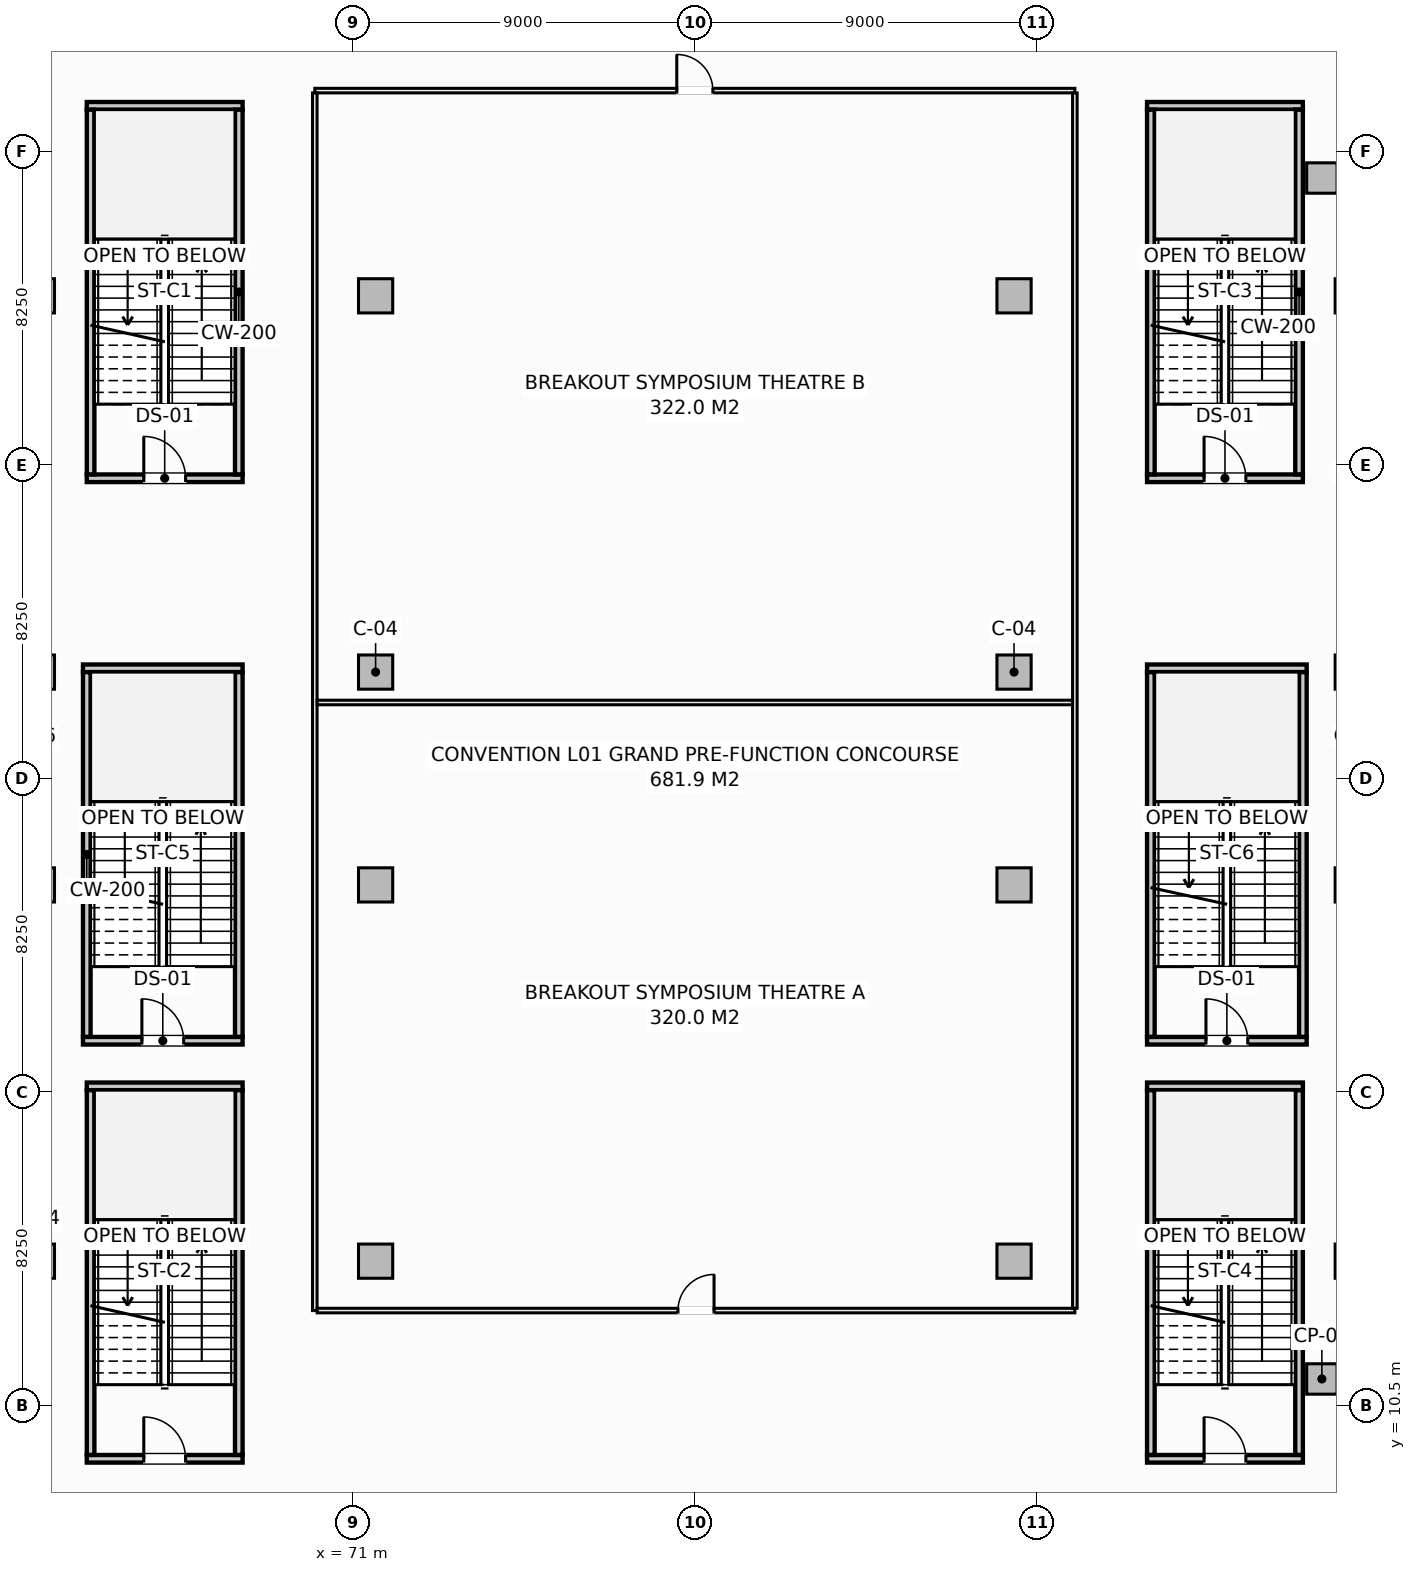
"""IFC4 building model, lengths in metres.
Left out: names, types, materials, properties, quantities, classifications, styles, units other than length and angle.
Written with IfcOpenShell. Run it as: python <this file> out.ifc"""

import sys

from ifc_helpers import new_model, si_unit, direction, frame, frame_2d, origin, origin_2d, place, context, subcontext, project, spatial, rectangle, extrude, element, fill, save


model = new_model("IFC4")
c1 = context("Model", 3, precision=1e-05, world=origin(), true_north=direction((0.0, 1.0)))
c2 = subcontext(c1, "Body", "Model", "MODEL_VIEW")
j1 = project(units=[si_unit("LENGTHUNIT", "METRE"), si_unit("PLANEANGLEUNIT", "RADIAN")], contexts=[c1])
p1 = place(None, origin())
s1 = spatial("IfcSite", under=j1, at=p1, CompositionType="ELEMENT")
p2 = place(p1, origin())
s2 = spatial("IfcBuilding", under=s1, at=p2, CompositionType="ELEMENT")
p3 = place(p2, frame((0.0, 0.0, 5.0)))
s3 = spatial("IfcBuildingStorey", under=s2, at=p3, CompositionType="ELEMENT", Elevation=5.0)
for number, where, z_axis, x_axis in (
    (1, (62.7, 14.3, -0.26), (0.0, 0.0, 1.0), (1.0, 0.0, 0.0)),
    (2, (62.7, 24.2, -0.26), (0.0, 0.0, 1.0), (1.0, 0.0, 0.0)),
    (3, (62.7, 29.8, -0.26), (0.0, 0.0, 1.0), (1.0, 0.0, 0.0)),
    (4, (62.7, 39.7, -0.26), (0.0, 0.0, 1.0), (1.0, 0.0, 0.0)),
    (5, (71.6, 14.3, -0.26), (0.0, 0.0, 1.0), (1.0, 0.0, 0.0)),
    (6, (71.6, 24.2, -0.26), (0.0, 0.0, 1.0), (1.0, 0.0, 0.0)),
    (7, (71.6, 29.8, -0.26), (0.0, 0.0, 1.0), (1.0, 0.0, 0.0)),
    (8, (71.6, 39.7, -0.26), (0.0, 0.0, 1.0), (1.0, 0.0, 0.0)),
    (9, (88.4, 14.3, -0.26), (0.0, 0.0, 1.0), (1.0, 0.0, 0.0)),
    (10, (88.4, 24.2, -0.26), (0.0, 0.0, 1.0), (1.0, 0.0, 0.0)),
    (11, (88.4, 29.8, -0.26), (0.0, 0.0, 1.0), (1.0, 0.0, 0.0)),
    (12, (88.4, 39.7, -0.26), (0.0, 0.0, 1.0), (1.0, 0.0, 0.0)),
    (13, (97.3, 14.3, -0.26), (0.0, 0.0, 1.0), (1.0, 0.0, 0.0)),
    (14, (97.3, 24.2, -0.26), (0.0, 0.0, 1.0), (1.0, 0.0, 0.0)),
    (15, (97.3, 29.8, -0.26), (0.0, 0.0, 1.0), (1.0, 0.0, 0.0)),
    (16, (97.3, 39.7, -0.26), (0.0, 0.0, 1.0), (1.0, 0.0, 0.0)),
):
    element("IfcColumn", number, at=place(p3, frame(where, z_axis=z_axis, x_axis=x_axis)), inside=s3, PredefinedType="COLUMN", context=c2, shape_type="SweptSolid", body=[
        extrude(rectangle(XDim=0.9, YDim=0.9, at=origin_2d()), origin(), (0.0, 0.0, 1.0), 5.0),
    ])
for number, where, z_axis, x_axis in (
    (17, (96.5, 11.2, -0.26), (0.0, 0.0, 1.0), (1.0, 0.0, 0.0)),
    (18, (96.5, 42.8, -0.26), (0.0, 0.0, 1.0), (1.0, 0.0, 0.0)),
):
    element("IfcColumn", number, at=place(p3, frame(where, z_axis=z_axis, x_axis=x_axis)), inside=s3, PredefinedType="PILASTER", context=c2, shape_type="SweptSolid", body=[
        extrude(rectangle(XDim=0.8, YDim=0.8, at=origin_2d()), origin(), (0.0, 0.0, 1.0), 5.0),
    ])
p4 = place(p3, frame((64.0, 34.9, -0.26), z_axis=(0.0, 0.0, 1.0), x_axis=(1.0, 0.0, 0.0)))
e19 = element("IfcWall", 19, at=p4, inside=s3, PredefinedType="SHEAR", context=c2, shape_type="SweptSolid", body=[
    extrude(rectangle(XDim=4.1, YDim=0.2, at=frame_2d((2.05, 0.0))), origin(), (0.0, 0.0, 1.0), 5.0),
])
p5 = place(p4, frame((1.5, 0.0, 0.26)))
e20 = element("IfcOpeningElement", 20, at=p5, cuts=e19, PredefinedType="OPENING", context=c2, shape_type="SweptSolid", body=[
    extrude(rectangle(XDim=1.1, YDim=2.15, at=frame_2d((0.55, 1.075))), frame((0.0, 0.11, 0.0), z_axis=(0.0, -1.0, 0.0), x_axis=(1.0, 0.0, 0.0)), (0.0, 0.0, 1.0), 0.22),
])
p6 = place(p3, frame((64.0, 44.7, -0.26), z_axis=(0.0, 0.0, 1.0), x_axis=(1.0, 0.0, 0.0)))
e21 = element("IfcWall", 21, at=p6, inside=s3, PredefinedType="SHEAR", context=c2, shape_type="SweptSolid", body=[
    extrude(rectangle(XDim=4.1, YDim=0.2, at=frame_2d((2.05, 0.0))), origin(), (0.0, 0.0, 1.0), 5.0),
])
for number, where, z_axis, x_axis in (
    (22, (64.1, 35.002, -0.26), (0.0, 0.0, 1.0), (0.0, 1.0, 0.0)),
    (23, (68.0, 35.002, -0.26), (0.0, 0.0, 1.0), (0.0, 1.0, 0.0)),
):
    element("IfcWall", number, at=place(p3, frame(where, z_axis=z_axis, x_axis=x_axis)), inside=s3, PredefinedType="SHEAR", context=c2, shape_type="SweptSolid", body=[
        extrude(rectangle(XDim=9.596, YDim=0.2, at=frame_2d((4.798, 0.0))), origin(), (0.0, 0.0, 1.0), 5.0),
    ])
p7 = place(p3, frame((64.0, 9.1, -0.26), z_axis=(0.0, 0.0, 1.0), x_axis=(1.0, 0.0, 0.0)))
e24 = element("IfcWall", 24, at=p7, inside=s3, PredefinedType="SHEAR", context=c2, shape_type="SweptSolid", body=[
    extrude(rectangle(XDim=4.1, YDim=0.2, at=frame_2d((2.05, 0.0))), origin(), (0.0, 0.0, 1.0), 5.0),
])
p8 = place(p7, frame((1.5, 0.0, 0.26)))
e25 = element("IfcOpeningElement", 25, at=p8, cuts=e24, PredefinedType="OPENING", context=c2, shape_type="SweptSolid", body=[
    extrude(rectangle(XDim=1.1, YDim=2.15, at=frame_2d((0.55, 1.075))), frame((0.0, 0.11, 0.0), z_axis=(0.0, -1.0, 0.0), x_axis=(1.0, 0.0, 0.0)), (0.0, 0.0, 1.0), 0.22),
])
p9 = place(p3, frame((64.0, 18.9, -0.26), z_axis=(0.0, 0.0, 1.0), x_axis=(1.0, 0.0, 0.0)))
e26 = element("IfcWall", 26, at=p9, inside=s3, PredefinedType="SHEAR", context=c2, shape_type="SweptSolid", body=[
    extrude(rectangle(XDim=4.1, YDim=0.2, at=frame_2d((2.05, 0.0))), origin(), (0.0, 0.0, 1.0), 5.0),
])
for number, where, z_axis, x_axis in (
    (27, (64.1, 9.202, -0.26), (0.0, 0.0, 1.0), (0.0, 1.0, 0.0)),
    (28, (68.0, 9.202, -0.26), (0.0, 0.0, 1.0), (0.0, 1.0, 0.0)),
):
    element("IfcWall", number, at=place(p3, frame(where, z_axis=z_axis, x_axis=x_axis)), inside=s3, PredefinedType="SHEAR", context=c2, shape_type="SweptSolid", body=[
        extrude(rectangle(XDim=9.596, YDim=0.2, at=frame_2d((4.798, 0.0))), origin(), (0.0, 0.0, 1.0), 5.0),
    ])
p10 = place(p3, frame((91.9, 34.9, -0.26), z_axis=(0.0, 0.0, 1.0), x_axis=(1.0, 0.0, 0.0)))
e29 = element("IfcWall", 29, at=p10, inside=s3, PredefinedType="SHEAR", context=c2, shape_type="SweptSolid", body=[
    extrude(rectangle(XDim=4.1, YDim=0.2, at=frame_2d((2.05, 0.0))), origin(), (0.0, 0.0, 1.0), 5.0),
])
p11 = place(p10, frame((1.5, 0.0, 0.26)))
e30 = element("IfcOpeningElement", 30, at=p11, cuts=e29, PredefinedType="OPENING", context=c2, shape_type="SweptSolid", body=[
    extrude(rectangle(XDim=1.1, YDim=2.15, at=frame_2d((0.55, 1.075))), frame((0.0, 0.11, 0.0), z_axis=(0.0, -1.0, 0.0), x_axis=(1.0, 0.0, 0.0)), (0.0, 0.0, 1.0), 0.22),
])
p12 = place(p3, frame((91.9, 44.7, -0.26), z_axis=(0.0, 0.0, 1.0), x_axis=(1.0, 0.0, 0.0)))
e31 = element("IfcWall", 31, at=p12, inside=s3, PredefinedType="SHEAR", context=c2, shape_type="SweptSolid", body=[
    extrude(rectangle(XDim=4.1, YDim=0.2, at=frame_2d((2.05, 0.0))), origin(), (0.0, 0.0, 1.0), 5.0),
])
for number, where, z_axis, x_axis in (
    (32, (92.0, 35.002, -0.26), (0.0, 0.0, 1.0), (0.0, 1.0, 0.0)),
    (33, (95.9, 35.002, -0.26), (0.0, 0.0, 1.0), (0.0, 1.0, 0.0)),
):
    element("IfcWall", number, at=place(p3, frame(where, z_axis=z_axis, x_axis=x_axis)), inside=s3, PredefinedType="SHEAR", context=c2, shape_type="SweptSolid", body=[
        extrude(rectangle(XDim=9.596, YDim=0.2, at=frame_2d((4.798, 0.0))), origin(), (0.0, 0.0, 1.0), 5.0),
    ])
p13 = place(p3, frame((91.9, 9.1, -0.26), z_axis=(0.0, 0.0, 1.0), x_axis=(1.0, 0.0, 0.0)))
e34 = element("IfcWall", 34, at=p13, inside=s3, PredefinedType="SHEAR", context=c2, shape_type="SweptSolid", body=[
    extrude(rectangle(XDim=4.1, YDim=0.2, at=frame_2d((2.05, 0.0))), origin(), (0.0, 0.0, 1.0), 5.0),
])
p14 = place(p13, frame((1.5, 0.0, 0.26)))
e35 = element("IfcOpeningElement", 35, at=p14, cuts=e34, PredefinedType="OPENING", context=c2, shape_type="SweptSolid", body=[
    extrude(rectangle(XDim=1.1, YDim=2.15, at=frame_2d((0.55, 1.075))), frame((0.0, 0.11, 0.0), z_axis=(0.0, -1.0, 0.0), x_axis=(1.0, 0.0, 0.0)), (0.0, 0.0, 1.0), 0.22),
])
p15 = place(p3, frame((91.9, 18.9, -0.26), z_axis=(0.0, 0.0, 1.0), x_axis=(1.0, 0.0, 0.0)))
e36 = element("IfcWall", 36, at=p15, inside=s3, PredefinedType="SHEAR", context=c2, shape_type="SweptSolid", body=[
    extrude(rectangle(XDim=4.1, YDim=0.2, at=frame_2d((2.05, 0.0))), origin(), (0.0, 0.0, 1.0), 5.0),
])
for number, where, z_axis, x_axis in (
    (37, (92.0, 9.202, -0.26), (0.0, 0.0, 1.0), (0.0, 1.0, 0.0)),
    (38, (95.9, 9.202, -0.26), (0.0, 0.0, 1.0), (0.0, 1.0, 0.0)),
):
    element("IfcWall", number, at=place(p3, frame(where, z_axis=z_axis, x_axis=x_axis)), inside=s3, PredefinedType="SHEAR", context=c2, shape_type="SweptSolid", body=[
        extrude(rectangle(XDim=9.596, YDim=0.2, at=frame_2d((4.798, 0.0))), origin(), (0.0, 0.0, 1.0), 5.0),
    ])
p16 = place(p3, frame((63.9, 20.1, -0.26), z_axis=(0.0, 0.0, 1.0), x_axis=(1.0, 0.0, 0.0)))
e39 = element("IfcWall", 39, at=p16, inside=s3, PredefinedType="SHEAR", context=c2, shape_type="SweptSolid", body=[
    extrude(rectangle(XDim=4.2, YDim=0.2, at=frame_2d((2.1, 0.0))), origin(), (0.0, 0.0, 1.0), 5.0),
])
p17 = place(p16, frame((1.55, 0.0, 0.26)))
e40 = element("IfcOpeningElement", 40, at=p17, cuts=e39, PredefinedType="OPENING", context=c2, shape_type="SweptSolid", body=[
    extrude(rectangle(XDim=1.1, YDim=2.15, at=frame_2d((0.55, 1.075))), frame((0.0, 0.11, 0.0), z_axis=(0.0, -1.0, 0.0), x_axis=(1.0, 0.0, 0.0)), (0.0, 0.0, 1.0), 0.22),
])
p18 = place(p3, frame((63.9, 29.9, -0.26), z_axis=(0.0, 0.0, 1.0), x_axis=(1.0, 0.0, 0.0)))
e41 = element("IfcWall", 41, at=p18, inside=s3, PredefinedType="SHEAR", context=c2, shape_type="SweptSolid", body=[
    extrude(rectangle(XDim=4.2, YDim=0.2, at=frame_2d((2.1, 0.0))), origin(), (0.0, 0.0, 1.0), 5.0),
])
for number, where, z_axis, x_axis in (
    (42, (64.0, 20.202, -0.26), (0.0, 0.0, 1.0), (0.0, 1.0, 0.0)),
    (43, (68.0, 20.202, -0.26), (0.0, 0.0, 1.0), (0.0, 1.0, 0.0)),
):
    element("IfcWall", number, at=place(p3, frame(where, z_axis=z_axis, x_axis=x_axis)), inside=s3, PredefinedType="SHEAR", context=c2, shape_type="SweptSolid", body=[
        extrude(rectangle(XDim=9.596, YDim=0.2, at=frame_2d((4.798, 0.0))), origin(), (0.0, 0.0, 1.0), 5.0),
    ])
p19 = place(p3, frame((91.9, 20.1, -0.26), z_axis=(0.0, 0.0, 1.0), x_axis=(1.0, 0.0, 0.0)))
e44 = element("IfcWall", 44, at=p19, inside=s3, PredefinedType="SHEAR", context=c2, shape_type="SweptSolid", body=[
    extrude(rectangle(XDim=4.2, YDim=0.2, at=frame_2d((2.1, 0.0))), origin(), (0.0, 0.0, 1.0), 5.0),
])
p20 = place(p19, frame((1.55, 0.0, 0.26)))
e45 = element("IfcOpeningElement", 45, at=p20, cuts=e44, PredefinedType="OPENING", context=c2, shape_type="SweptSolid", body=[
    extrude(rectangle(XDim=1.1, YDim=2.15, at=frame_2d((0.55, 1.075))), frame((0.0, 0.11, 0.0), z_axis=(0.0, -1.0, 0.0), x_axis=(1.0, 0.0, 0.0)), (0.0, 0.0, 1.0), 0.22),
])
p21 = place(p3, frame((91.9, 29.9, -0.26), z_axis=(0.0, 0.0, 1.0), x_axis=(1.0, 0.0, 0.0)))
e46 = element("IfcWall", 46, at=p21, inside=s3, PredefinedType="SHEAR", context=c2, shape_type="SweptSolid", body=[
    extrude(rectangle(XDim=4.2, YDim=0.2, at=frame_2d((2.1, 0.0))), origin(), (0.0, 0.0, 1.0), 5.0),
])
for number, where, z_axis, x_axis in (
    (47, (92.0, 20.202, -0.26), (0.0, 0.0, 1.0), (0.0, 1.0, 0.0)),
    (48, (96.0, 20.202, -0.26), (0.0, 0.0, 1.0), (0.0, 1.0, 0.0)),
):
    element("IfcWall", number, at=place(p3, frame(where, z_axis=z_axis, x_axis=x_axis)), inside=s3, PredefinedType="SHEAR", context=c2, shape_type="SweptSolid", body=[
        extrude(rectangle(XDim=9.596, YDim=0.2, at=frame_2d((4.798, 0.0))), origin(), (0.0, 0.0, 1.0), 5.0),
    ])
p22 = place(p3, frame((70.0, 45.1, 0.0), z_axis=(0.0, 0.0, 1.0), x_axis=(1.0, 0.0, 0.0)))
e49 = element("IfcWall", 49, at=p22, inside=s3, PredefinedType="PARTITIONING", context=c2, shape_type="SweptSolid", body=[
    extrude(rectangle(XDim=20.0, YDim=0.12, at=frame_2d((10.0, 0.0))), origin(), (0.0, 0.0, 1.0), 4.74),
])
p23 = place(p22, frame((9.525, 0.0, 0.0)))
e50 = element("IfcOpeningElement", 50, at=p23, cuts=e49, PredefinedType="OPENING", context=c2, shape_type="SweptSolid", body=[
    extrude(rectangle(XDim=0.95, YDim=2.1, at=frame_2d((0.475, 1.05))), frame((0.0, 0.07, 0.0), z_axis=(0.0, -1.0, 0.0), x_axis=(1.0, 0.0, 0.0)), (0.0, 0.0, 1.0), 0.14),
])
p24 = place(p3, frame((70.0, 13.0, 0.0), z_axis=(0.0, 0.0, 1.0), x_axis=(0.0, 1.0, 0.0)))
e51 = element("IfcWall", 51, at=p24, inside=s3, PredefinedType="PARTITIONING", context=c2, shape_type="SweptSolid", body=[
    extrude(rectangle(XDim=32.038, YDim=0.12, at=frame_2d((16.019, 0.0))), origin(), (0.0, 0.0, 1.0), 4.74),
])
p25 = place(p3, frame((70.062, 13.0, 0.0), z_axis=(0.0, 0.0, 1.0), x_axis=(1.0, 0.0, 0.0)))
e52 = element("IfcWall", 52, at=p25, inside=s3, PredefinedType="PARTITIONING", context=c2, shape_type="SweptSolid", body=[
    extrude(rectangle(XDim=19.938, YDim=0.12, at=frame_2d((9.969, 0.0))), origin(), (0.0, 0.0, 1.0), 4.74),
])
p26 = place(p25, frame((9.494, 0.0, 0.0)))
e53 = element("IfcOpeningElement", 53, at=p26, cuts=e52, PredefinedType="OPENING", context=c2, shape_type="SweptSolid", body=[
    extrude(rectangle(XDim=0.95, YDim=2.1, at=frame_2d((0.475, 1.05))), frame((0.0, 0.07, 0.0), z_axis=(0.0, -1.0, 0.0), x_axis=(1.0, 0.0, 0.0)), (0.0, 0.0, 1.0), 0.14),
])
p27 = place(p3, frame((90.0, 13.062, 0.0), z_axis=(0.0, 0.0, 1.0), x_axis=(0.0, 1.0, 0.0)))
e54 = element("IfcWall", 54, at=p27, inside=s3, PredefinedType="PARTITIONING", context=c2, shape_type="SweptSolid", body=[
    extrude(rectangle(XDim=31.976, YDim=0.12, at=frame_2d((15.988, 0.0))), origin(), (0.0, 0.0, 1.0), 4.74),
])
p28 = place(p3, frame((70.062, 29.0, 0.0), z_axis=(0.0, 0.0, 1.0), x_axis=(1.0, 0.0, 0.0)))
e55 = element("IfcWall", 55, at=p28, inside=s3, PredefinedType="PARTITIONING", context=c2, shape_type="SweptSolid", body=[
    extrude(rectangle(XDim=19.876, YDim=0.12, at=frame_2d((9.938, 0.0))), origin(), (0.0, 0.0, 1.0), 4.74),
])
p29 = place(p5, origin())
e56 = element("IfcDoor", 56, at=p29, inside=s3, OperationType="SINGLE_SWING_LEFT", PredefinedType="DOOR", context=c2, shape_type="SweptSolid", body=[
    extrude(rectangle(XDim=1.1, YDim=2.15, at=frame_2d((0.55, 1.075))), frame((0.0, 0.025, 0.0), z_axis=(0.0, -1.0, 0.0), x_axis=(1.0, 0.0, 0.0)), (0.0, 0.0, 1.0), 0.05),
])
fill(e20, e56)
p30 = place(p8, origin())
e57 = element("IfcDoor", 57, at=p30, inside=s3, OperationType="SINGLE_SWING_LEFT", PredefinedType="DOOR", context=c2, shape_type="SweptSolid", body=[
    extrude(rectangle(XDim=1.1, YDim=2.15, at=frame_2d((0.55, 1.075))), frame((0.0, 0.025, 0.0), z_axis=(0.0, -1.0, 0.0), x_axis=(1.0, 0.0, 0.0)), (0.0, 0.0, 1.0), 0.05),
])
fill(e25, e57)
p31 = place(p11, origin())
e58 = element("IfcDoor", 58, at=p31, inside=s3, OperationType="SINGLE_SWING_LEFT", PredefinedType="DOOR", context=c2, shape_type="SweptSolid", body=[
    extrude(rectangle(XDim=1.1, YDim=2.15, at=frame_2d((0.55, 1.075))), frame((0.0, 0.025, 0.0), z_axis=(0.0, -1.0, 0.0), x_axis=(1.0, 0.0, 0.0)), (0.0, 0.0, 1.0), 0.05),
])
fill(e30, e58)
p32 = place(p14, origin())
e59 = element("IfcDoor", 59, at=p32, inside=s3, OperationType="SINGLE_SWING_LEFT", PredefinedType="DOOR", context=c2, shape_type="SweptSolid", body=[
    extrude(rectangle(XDim=1.1, YDim=2.15, at=frame_2d((0.55, 1.075))), frame((0.0, 0.025, 0.0), z_axis=(0.0, -1.0, 0.0), x_axis=(1.0, 0.0, 0.0)), (0.0, 0.0, 1.0), 0.05),
])
fill(e35, e59)
p33 = place(p17, origin())
e60 = element("IfcDoor", 60, at=p33, inside=s3, OperationType="SINGLE_SWING_LEFT", PredefinedType="DOOR", context=c2, shape_type="SweptSolid", body=[
    extrude(rectangle(XDim=1.1, YDim=2.15, at=frame_2d((0.55, 1.075))), frame((0.0, 0.025, 0.0), z_axis=(0.0, -1.0, 0.0), x_axis=(1.0, 0.0, 0.0)), (0.0, 0.0, 1.0), 0.05),
])
fill(e40, e60)
p34 = place(p20, origin())
e61 = element("IfcDoor", 61, at=p34, inside=s3, OperationType="SINGLE_SWING_LEFT", PredefinedType="DOOR", context=c2, shape_type="SweptSolid", body=[
    extrude(rectangle(XDim=1.1, YDim=2.15, at=frame_2d((0.55, 1.075))), frame((0.0, 0.025, 0.0), z_axis=(0.0, -1.0, 0.0), x_axis=(1.0, 0.0, 0.0)), (0.0, 0.0, 1.0), 0.05),
])
fill(e45, e61)
p35 = place(p26, origin())
e62 = element("IfcDoor", 62, at=p35, inside=s3, OperationType="SINGLE_SWING_RIGHT", PredefinedType="DOOR", context=c2, shape_type="SweptSolid", body=[
    extrude(rectangle(XDim=0.95, YDim=2.1, at=frame_2d((0.475, 1.05))), frame((0.0, 0.025, 0.0), z_axis=(0.0, -1.0, 0.0), x_axis=(1.0, 0.0, 0.0)), (0.0, 0.0, 1.0), 0.05),
])
fill(e53, e62)
p36 = place(p23, origin())
e63 = element("IfcDoor", 63, at=p36, inside=s3, OperationType="SINGLE_SWING_LEFT", PredefinedType="DOOR", context=c2, shape_type="SweptSolid", body=[
    extrude(rectangle(XDim=0.95, YDim=2.1, at=frame_2d((0.475, 1.05))), frame((0.0, 0.025, 0.0), z_axis=(0.0, -1.0, 0.0), x_axis=(1.0, 0.0, 0.0)), (0.0, 0.0, 1.0), 0.05),
])
fill(e50, e63)
save(model, sys.argv[1])
